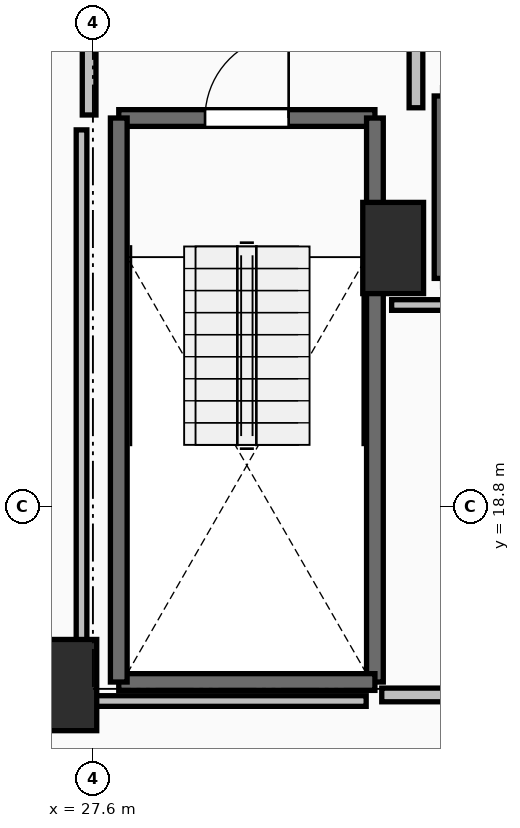
"""IFC4 building model, lengths in metres.
Left out: names, types, materials, properties, quantities, classifications, styles, units other than length and angle.
Written with IfcOpenShell. Run it as: python <this file> out.ifc"""

import sys

from ifc_helpers import new_model, si_unit, direction, frame, frame_2d, origin, origin_2d, place, context, subcontext, project, spatial, rectangle, extrude, element, fill, save


model = new_model("IFC4")
c1 = context("Model", 3, precision=1e-05, world=origin(), true_north=direction((0.0, 1.0)))
c2 = subcontext(c1, "Body", "Model", "MODEL_VIEW")
j1 = project(units=[si_unit("LENGTHUNIT", "METRE"), si_unit("PLANEANGLEUNIT", "RADIAN")], contexts=[c1])
p1 = place(None, origin())
s1 = spatial("IfcSite", under=j1, at=p1, CompositionType="ELEMENT")
p2 = place(p1, origin())
s2 = spatial("IfcBuilding", under=s1, at=p2, CompositionType="ELEMENT")
p3 = place(p2, frame((0.0, 0.0, 85.8)))
s3 = spatial("IfcBuildingStorey", under=s2, at=p3, CompositionType="ELEMENT", Elevation=85.8)
for number, where, z_axis, x_axis in (
    (1, (27.25, 16.45, 0.0), (0.0, 0.0, 1.0), (1.0, 0.0, 0.0)),
    (2, (31.55, 22.2, 0.0), (0.0, 0.0, 1.0), (1.0, 0.0, 0.0)),
):
    element("IfcColumn", number, at=place(p3, frame(where, z_axis=z_axis, x_axis=x_axis)), inside=s3, PredefinedType="PILASTER", context=c2, shape_type="SweptSolid", body=[
        extrude(rectangle(XDim=0.8, YDim=1.2, at=origin_2d()), origin(), (0.0, 0.0, 1.0), 3.5),
    ])
p4 = place(p3, frame((27.94, 23.91, 0.0), z_axis=(0.0, 0.0, 1.0), x_axis=(1.0, 0.0, 0.0)))
e3 = element("IfcWall", 3, at=p4, inside=s3, PredefinedType="SOLIDWALL", context=c2, shape_type="SweptSolid", body=[
    extrude(rectangle(XDim=3.37, YDim=0.22, at=frame_2d((1.685, 0.0))), origin(), (0.0, 0.0, 1.0), 3.24),
])
p5 = place(p4, frame((1.135, 0.0, 0.0)))
e4 = element("IfcOpeningElement", 4, at=p5, cuts=e3, PredefinedType="OPENING", context=c2, shape_type="SweptSolid", body=[
    extrude(rectangle(XDim=1.1, YDim=2.15, at=frame_2d((0.55, 1.075))), frame((0.0, 0.125, 0.0), z_axis=(0.0, -1.0, 0.0), x_axis=(1.0, 0.0, 0.0)), (0.0, 0.0, 1.0), 0.25),
])
p6 = place(p3, frame((31.31, 23.91, 0.0), z_axis=(0.0, 0.0, 1.0), x_axis=(0.0, -1.0, 0.0)))
e5 = element("IfcWall", 5, at=p6, inside=s3, PredefinedType="SOLIDWALL", context=c2, shape_type="SweptSolid", body=[
    extrude(rectangle(XDim=7.42, YDim=0.22, at=frame_2d((3.71, 0.0))), origin(), (0.0, 0.0, 1.0), 3.24),
])
p7 = place(p3, frame((31.31, 16.49, 0.0), z_axis=(0.0, 0.0, 1.0), x_axis=(-1.0, 0.0, 0.0)))
e6 = element("IfcWall", 6, at=p7, inside=s3, PredefinedType="SOLIDWALL", context=c2, shape_type="SweptSolid", body=[
    extrude(rectangle(XDim=3.37, YDim=0.22, at=frame_2d((1.685, 0.0))), origin(), (0.0, 0.0, 1.0), 3.24),
])
p8 = place(p3, frame((27.94, 16.49, 0.0), z_axis=(0.0, 0.0, 1.0), x_axis=(0.0, 1.0, 0.0)))
e7 = element("IfcWall", 7, at=p8, inside=s3, PredefinedType="SOLIDWALL", context=c2, shape_type="SweptSolid", body=[
    extrude(rectangle(XDim=7.42, YDim=0.22, at=frame_2d((3.71, 0.0))), origin(), (0.0, 0.0, 1.0), 3.24),
])
p9 = place(p3, frame((32.2, 24.2, 0.0), z_axis=(0.0, 0.0, 1.0), x_axis=(0.0, -1.0, 0.0)))
e8 = element("IfcWall", 8, at=p9, inside=s3, PredefinedType="SOLIDWALL", context=c2, shape_type="SweptSolid", body=[
    extrude(rectangle(XDim=2.4, YDim=0.22, at=frame_2d((1.2, 0.0))), origin(), (0.0, 0.0, 1.0), 3.24),
])
p10 = place(p3, frame((31.85, 24.045, 0.0), z_axis=(0.0, 0.0, 1.0), x_axis=(0.0, 1.0, 0.0)))
e9 = element("IfcWall", 9, at=p10, inside=s3, PredefinedType="PARTITIONING", context=c2, shape_type="SweptSolid", body=[
    extrude(rectangle(XDim=3.91, YDim=0.18, at=frame_2d((1.955, 0.0))), origin(), (0.0, 0.0, 1.0), 3.24),
])
p11 = place(p10, frame((1.355, 0.0, 0.0)))
e10 = element("IfcOpeningElement", 10, at=p11, cuts=e9, PredefinedType="OPENING", context=c2, shape_type="SweptSolid", body=[
    extrude(rectangle(XDim=1.2, YDim=2.15, at=frame_2d((0.6, 1.075))), frame((0.0, 0.105, 0.0), z_axis=(0.0, -1.0, 0.0), x_axis=(1.0, 0.0, 0.0)), (0.0, 0.0, 1.0), 0.21),
])
p12 = place(p3, frame((27.55, 28.0, 0.0), z_axis=(0.0, 0.0, 1.0), x_axis=(0.0, -1.0, 0.0)))
e11 = element("IfcWall", 11, at=p12, inside=s3, PredefinedType="PARTITIONING", context=c2, shape_type="SweptSolid", body=[
    extrude(rectangle(XDim=4.05, YDim=0.18, at=frame_2d((2.025, 0.0))), origin(), (0.0, 0.0, 1.0), 3.24),
])
p13 = place(p12, frame((1.425, 0.0, 0.0)))
e12 = element("IfcOpeningElement", 12, at=p13, cuts=e11, PredefinedType="OPENING", context=c2, shape_type="SweptSolid", body=[
    extrude(rectangle(XDim=1.2, YDim=2.15, at=frame_2d((0.6, 1.075))), frame((0.0, 0.105, 0.0), z_axis=(0.0, -1.0, 0.0), x_axis=(1.0, 0.0, 0.0)), (0.0, 0.0, 1.0), 0.21),
])
p14 = place(p3, frame((31.4, 16.32, 0.0), z_axis=(0.0, 0.0, 1.0), x_axis=(1.0, 0.0, 0.0)))
e13 = element("IfcWall", 13, at=p14, inside=s3, PredefinedType="PARTITIONING", context=c2, shape_type="SweptSolid", body=[
    extrude(rectangle(XDim=3.65, YDim=0.18, at=frame_2d((1.825, 0.0))), origin(), (0.0, 0.0, 1.0), 3.24),
])
p15 = place(p14, frame((1.4, 0.0, 0.0)))
e14 = element("IfcOpeningElement", 14, at=p15, cuts=e13, PredefinedType="OPENING", context=c2, shape_type="SweptSolid", body=[
    extrude(rectangle(XDim=0.85, YDim=2.1, at=frame_2d((0.425, 1.05))), frame((0.0, 0.105, 0.0), z_axis=(0.0, -1.0, 0.0), x_axis=(1.0, 0.0, 0.0)), (0.0, 0.0, 1.0), 0.21),
])
p16 = place(p3, frame((34.83, 21.45, 0.0), z_axis=(0.0, 0.0, 1.0), x_axis=(-1.0, 0.0, 0.0)))
e15 = element("IfcWall", 15, at=p16, inside=s3, PredefinedType="PARTITIONING", context=c2, shape_type="SweptSolid", body=[
    extrude(rectangle(XDim=3.3, YDim=0.14, at=frame_2d((1.65, 0.0))), origin(), (0.0, 0.0, 1.0), 3.24),
])
p17 = place(p3, frame((31.195, 16.24, 0.0), z_axis=(0.0, 0.0, 1.0), x_axis=(-1.0, 0.0, 0.0)))
e16 = element("IfcWall", 16, at=p17, inside=s3, PredefinedType="PARTITIONING", context=c2, shape_type="SweptSolid", body=[
    extrude(rectangle(XDim=3.745, YDim=0.14, at=frame_2d((1.873, 0.0))), origin(), (0.0, 0.0, 1.0), 2.432),
])
p18 = place(p3, frame((27.45, 16.24, 0.0), z_axis=(0.0, 0.0, 1.0), x_axis=(0.0, 1.0, 0.0)))
e17 = element("IfcWall", 17, at=p18, inside=s3, PredefinedType="PARTITIONING", context=c2, shape_type="SweptSolid", body=[
    extrude(rectangle(XDim=7.514, YDim=0.14, at=frame_2d((3.757, 0.0))), origin(), (0.0, 0.0, 1.0), 2.432),
])
p19 = place(p5, origin())
e18 = element("IfcDoor", 18, at=p19, inside=s3, OperationType="SINGLE_SWING_RIGHT", PredefinedType="DOOR", context=c2, shape_type="SweptSolid", body=[
    extrude(rectangle(XDim=1.1, YDim=2.15, at=frame_2d((0.55, 1.075))), frame((0.0, 0.025, 0.0), z_axis=(0.0, -1.0, 0.0), x_axis=(1.0, 0.0, 0.0)), (0.0, 0.0, 1.0), 0.05),
])
fill(e4, e18)
save(model, sys.argv[1])
